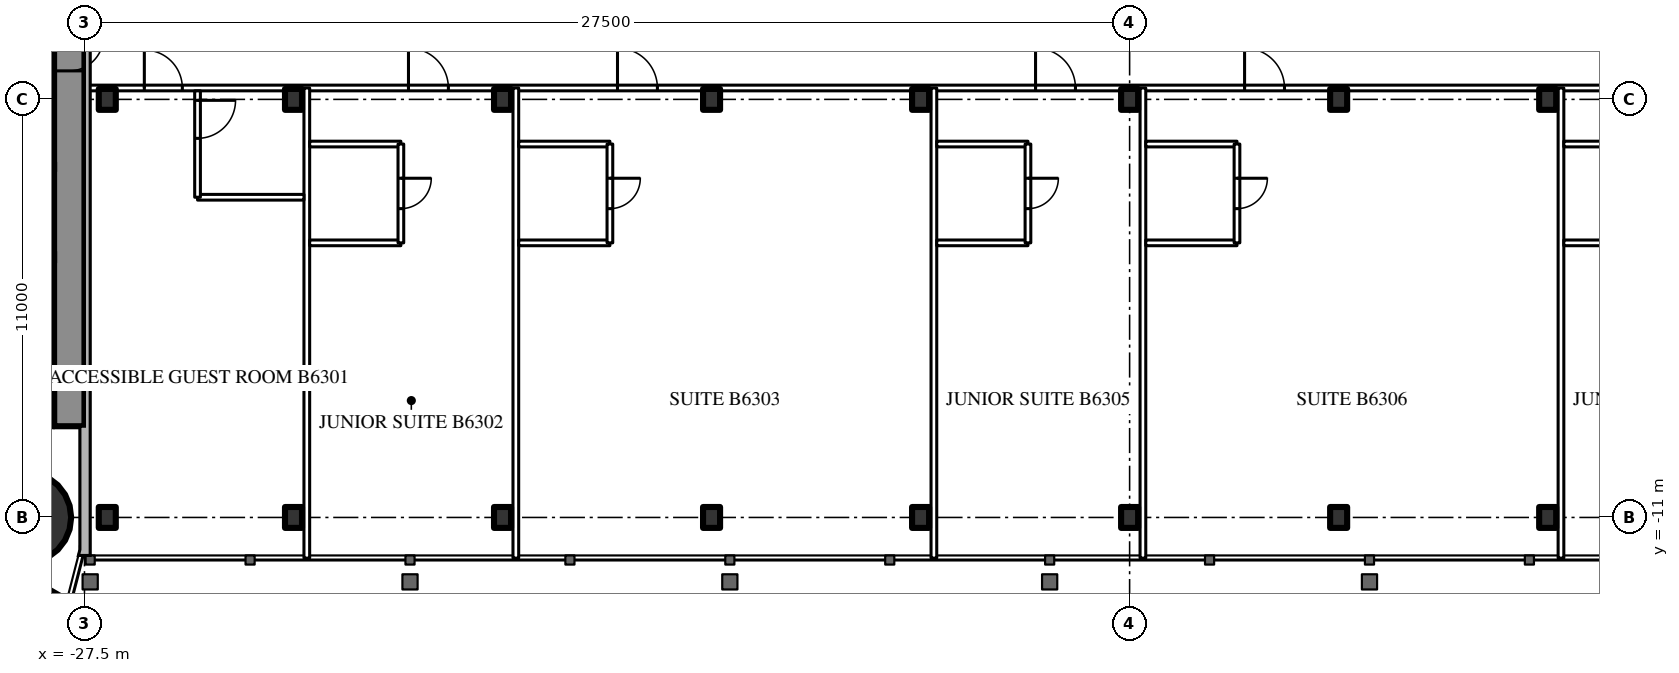
"""IFC4 building model, lengths in metres.
Left out: names, types, materials, properties, quantities, classifications, styles, units other than length and angle.
Written with IfcOpenShell. Run it as: python <this file> out.ifc"""

import sys

from ifc_helpers import new_model, si_unit, direction, frame, frame_2d, origin, origin_2d, place, context, subcontext, project, spatial, rectangle, circle, i_section, extrude, element, fill, save


model = new_model("IFC4")
c1 = context("Model", 3, precision=1e-05, world=origin(), true_north=direction((0.0, 1.0)))
c2 = subcontext(c1, "Body", "Model", "MODEL_VIEW")
j1 = project(units=[si_unit("LENGTHUNIT", "METRE"), si_unit("PLANEANGLEUNIT", "RADIAN")], contexts=[c1])
p1 = place(None, origin())
s1 = spatial("IfcSite", under=j1, at=p1, CompositionType="ELEMENT")
p2 = place(p1, origin())
s2 = spatial("IfcBuilding", under=s1, at=p2, CompositionType="ELEMENT")
p3 = place(p2, frame((0.0, 0.0, 236.9)))
s3 = spatial("IfcBuildingStorey", under=s2, at=p3, CompositionType="ELEMENT", Elevation=236.9)
p4 = place(p3, frame((-29.05, -11.0, 0.0), z_axis=(0.0, 0.0, 1.0), x_axis=(1.0, 0.0, 0.0)))
e1 = element("IfcColumn", 1, at=p4, inside=s3, PredefinedType="COLUMN", context=c2, shape_type="SweptSolid", body=[
    extrude(circle(Radius=1.2, at=origin_2d()), origin(), (0.0, 0.0, 1.0), 3.6),
])
p5 = place(p3, frame((-27.9, 8.6, 0.0), z_axis=(0.0, 0.0, 1.0), x_axis=(0.0, -1.0, 0.0)))
e2 = element("IfcWall", 2, at=p5, inside=s3, PredefinedType="SHEAR", context=c2, shape_type="SweptSolid", body=[
    extrude(rectangle(XDim=17.2, YDim=0.8, at=frame_2d((8.6, 0.0))), origin(), (0.0, 0.0, 1.0), 3.6),
])
p6 = place(p5, frame((6.95, 0.0, 0.0)))
e3 = element("IfcOpeningElement", 3, at=p6, cuts=e2, PredefinedType="OPENING", context=c2, shape_type="SweptSolid", body=[
    extrude(rectangle(XDim=0.9, YDim=2.2, at=frame_2d((0.45, 1.1))), frame((0.0, 0.41, 0.0), z_axis=(0.0, -1.0, 0.0), x_axis=(1.0, 0.0, 0.0)), (0.0, 0.0, 1.0), 0.82),
])
p7 = place(p3, frame((-28.3, -8.0, 0.0), z_axis=(0.0, 0.0, 1.0), x_axis=(-1.0, 0.0, 0.0)))
e4 = element("IfcWall", 4, at=p7, inside=s3, PredefinedType="SHEAR", context=c2, shape_type="SweptSolid", body=[
    extrude(rectangle(XDim=8.4, YDim=1.2, at=frame_2d((4.2, 0.0))), origin(), (0.0, 0.0, 1.0), 3.6),
])
p8 = place(p7, frame((0.25, 0.0, 0.0)))
e5 = element("IfcOpeningElement", 5, at=p8, cuts=e4, PredefinedType="OPENING", context=c2, shape_type="SweptSolid", body=[
    extrude(rectangle(XDim=1.0, YDim=2.2, at=frame_2d((0.5, 1.1))), frame((0.0, 0.61, 0.0), z_axis=(0.0, -1.0, 0.0), x_axis=(1.0, 0.0, 0.0)), (0.0, 0.0, 1.0), 1.22),
])
p9 = place(p3, frame((-28.3, -4.15, 0.0), z_axis=(0.0, 0.0, 1.0), x_axis=(-1.0, 0.0, 0.0)))
e6 = element("IfcWall", 6, at=p9, inside=s3, PredefinedType="SHEAR", context=c2, shape_type="SweptSolid", body=[
    extrude(rectangle(XDim=8.4, YDim=0.3, at=frame_2d((4.2, 0.0))), origin(), (0.0, 0.0, 1.0), 3.6),
])
p10 = place(p3, frame((-28.3, -1.775, 0.0), z_axis=(0.0, 0.0, 1.0), x_axis=(-1.0, 0.0, 0.0)))
e7 = element("IfcWall", 7, at=p10, inside=s3, PredefinedType="SHEAR", context=c2, shape_type="SweptSolid", body=[
    extrude(rectangle(XDim=2.9, YDim=0.25, at=frame_2d((1.45, 0.0))), origin(), (0.0, 0.0, 1.0), 3.6),
])
p11 = place(p3, frame((-27.2, 14.3, 0.0), z_axis=(0.0, 0.0, 1.0), x_axis=(-0.866026593062, -0.499997940104, 0.0)))
e8 = element("IfcWall", 8, at=p11, inside=s3, PredefinedType="SHEAR", context=c2, shape_type="SweptSolid", body=[
    extrude(rectangle(XDim=28.946, YDim=1.2, at=frame_2d((14.473, 0.0))), origin(), (0.0, 0.0, 1.0), 3.6),
])
p12 = place(p11, frame((4.6, 0.0, 0.0)))
e9 = element("IfcOpeningElement", 9, at=p12, cuts=e8, PredefinedType="OPENING", context=c2, shape_type="SweptSolid", body=[
    extrude(rectangle(XDim=1.0, YDim=2.2, at=frame_2d((0.5, 1.1))), frame((0.0, 0.61, 0.0), z_axis=(0.0, -1.0, 0.0), x_axis=(1.0, 0.0, 0.0)), (0.0, 0.0, 1.0), 1.22),
])
p13 = place(p11, frame((13.395, 0.0, 0.0)))
e10 = element("IfcOpeningElement", 10, at=p13, cuts=e8, PredefinedType="OPENING", context=c2, shape_type="SweptSolid", body=[
    extrude(rectangle(XDim=1.8, YDim=2.2, at=frame_2d((0.9, 1.1))), frame((0.0, 0.61, 0.0), z_axis=(0.0, -1.0, 0.0), x_axis=(1.0, 0.0, 0.0)), (0.0, 0.0, 1.0), 1.22),
])
p14 = place(p3, frame((-27.2, -14.3, 0.0), z_axis=(0.0, 0.0, 1.0), x_axis=(-0.866024021859, 0.500002393557, 0.0)))
e11 = element("IfcWall", 11, at=p14, inside=s3, PredefinedType="SHEAR", context=c2, shape_type="SweptSolid", body=[
    extrude(rectangle(XDim=27.907, YDim=1.2, at=frame_2d((13.954, 0.0))), origin(), (0.0, 0.0, 1.0), 3.6),
])
p15 = place(p14, frame((4.6, 0.0, 0.0)))
e12 = element("IfcOpeningElement", 12, at=p15, cuts=e11, PredefinedType="OPENING", context=c2, shape_type="SweptSolid", body=[
    extrude(rectangle(XDim=1.0, YDim=2.2, at=frame_2d((0.5, 1.1))), frame((0.0, 0.61, 0.0), z_axis=(0.0, -1.0, 0.0), x_axis=(1.0, 0.0, 0.0)), (0.0, 0.0, 1.0), 1.22),
])
p16 = place(p14, frame((13.395, 0.0, 0.0)))
e13 = element("IfcOpeningElement", 13, at=p16, cuts=e11, PredefinedType="OPENING", context=c2, shape_type="SweptSolid", body=[
    extrude(rectangle(XDim=1.8, YDim=2.2, at=frame_2d((0.9, 1.1))), frame((0.0, 0.61, 0.0), z_axis=(0.0, -1.0, 0.0), x_axis=(1.0, 0.0, 0.0)), (0.0, 0.0, 1.0), 1.22),
])
for number, where, z_axis, x_axis in (
    (14, (-26.9, -11.0, 0.0), (0.0, 0.0, 1.0), (1.0, 0.0, 0.0)),
    (15, (-22.0, -11.0, 0.0), (0.0, 0.0, 1.0), (1.0, 0.0, 0.0)),
    (16, (-16.5, -11.0, 0.0), (0.0, 0.0, 1.0), (1.0, 0.0, 0.0)),
    (17, (-11.0, -11.0, 0.0), (0.0, 0.0, 1.0), (1.0, 0.0, 0.0)),
    (18, (-5.5, -11.0, 0.0), (0.0, 0.0, 1.0), (1.0, 0.0, 0.0)),
    (19, (0.0, -11.0, 0.0), (0.0, 0.0, 1.0), (1.0, 0.0, 0.0)),
    (20, (5.5, -11.0, 0.0), (0.0, 0.0, 1.0), (1.0, 0.0, 0.0)),
    (21, (11.0, -11.0, 0.0), (0.0, 0.0, 1.0), (1.0, 0.0, 0.0)),
    (22, (-26.9, 0.0, 0.0), (0.0, 0.0, 1.0), (1.0, 0.0, 0.0)),
    (23, (-22.0, 0.0, 0.0), (0.0, 0.0, 1.0), (1.0, 0.0, 0.0)),
    (24, (-16.5, 0.0, 0.0), (0.0, 0.0, 1.0), (1.0, 0.0, 0.0)),
    (25, (-11.0, 0.0, 0.0), (0.0, 0.0, 1.0), (1.0, 0.0, 0.0)),
    (26, (-5.5, 0.0, 0.0), (0.0, 0.0, 1.0), (1.0, 0.0, 0.0)),
    (27, (0.0, 0.0, 0.0), (0.0, 0.0, 1.0), (1.0, 0.0, 0.0)),
    (28, (5.5, 0.0, 0.0), (0.0, 0.0, 1.0), (1.0, 0.0, 0.0)),
    (29, (11.0, 0.0, 0.0), (0.0, 0.0, 1.0), (1.0, 0.0, 0.0)),
):
    element("IfcColumn", number, at=place(p3, frame(where, z_axis=z_axis, x_axis=x_axis)), inside=s3, PredefinedType="COLUMN", context=c2, shape_type="SweptSolid", body=[
        extrude(i_section(OverallWidth=0.448, OverallDepth=0.55, WebThickness=0.072, FlangeThickness=0.115, FilletRadius=0.02, at=origin_2d()), origin(), (0.0, 0.0, 1.0), 3.6),
    ])
p17 = place(p3, frame((-27.5, 0.3, 0.0), z_axis=(0.0, 0.0, 1.0), x_axis=(1.0, 0.0, 0.0)))
e30 = element("IfcWall", 30, at=p17, inside=s3, PredefinedType="PARTITIONING", context=c2, shape_type="SweptSolid", body=[
    extrude(rectangle(XDim=55.0, YDim=0.15, at=frame_2d((27.5, 0.0))), origin(), (0.0, 0.0, 1.0), 2.4),
])
p18 = place(p17, frame((1.575, 0.0, 0.0)))
e31 = element("IfcOpeningElement", 31, at=p18, cuts=e30, PredefinedType="OPENING", context=c2, shape_type="SweptSolid", body=[
    extrude(rectangle(XDim=1.0, YDim=2.2, at=frame_2d((0.5, 1.1))), frame((0.0, 0.085, 0.0), z_axis=(0.0, -1.0, 0.0), x_axis=(1.0, 0.0, 0.0)), (0.0, 0.0, 1.0), 0.17),
])
p19 = place(p17, frame((8.525, 0.0, 0.0)))
e32 = element("IfcOpeningElement", 32, at=p19, cuts=e30, PredefinedType="OPENING", context=c2, shape_type="SweptSolid", body=[
    extrude(rectangle(XDim=1.05, YDim=2.4, at=frame_2d((0.525, 1.2))), frame((0.0, 0.085, 0.0), z_axis=(0.0, -1.0, 0.0), x_axis=(1.0, 0.0, 0.0)), (0.0, 0.0, 1.0), 0.17),
])
p20 = place(p17, frame((14.025, 0.0, 0.0)))
e33 = element("IfcOpeningElement", 33, at=p20, cuts=e30, PredefinedType="OPENING", context=c2, shape_type="SweptSolid", body=[
    extrude(rectangle(XDim=1.05, YDim=2.4, at=frame_2d((0.525, 1.2))), frame((0.0, 0.085, 0.0), z_axis=(0.0, -1.0, 0.0), x_axis=(1.0, 0.0, 0.0)), (0.0, 0.0, 1.0), 0.17),
])
p21 = place(p17, frame((25.025, 0.0, 0.0)))
e34 = element("IfcOpeningElement", 34, at=p21, cuts=e30, PredefinedType="OPENING", context=c2, shape_type="SweptSolid", body=[
    extrude(rectangle(XDim=1.05, YDim=2.4, at=frame_2d((0.525, 1.2))), frame((0.0, 0.085, 0.0), z_axis=(0.0, -1.0, 0.0), x_axis=(1.0, 0.0, 0.0)), (0.0, 0.0, 1.0), 0.17),
])
p22 = place(p17, frame((30.525, 0.0, 0.0)))
e35 = element("IfcOpeningElement", 35, at=p22, cuts=e30, PredefinedType="OPENING", context=c2, shape_type="SweptSolid", body=[
    extrude(rectangle(XDim=1.05, YDim=2.4, at=frame_2d((0.525, 1.2))), frame((0.0, 0.085, 0.0), z_axis=(0.0, -1.0, 0.0), x_axis=(1.0, 0.0, 0.0)), (0.0, 0.0, 1.0), 0.17),
])
p23 = place(p17, frame((41.525, 0.0, 0.0)))
e36 = element("IfcOpeningElement", 36, at=p23, cuts=e30, PredefinedType="OPENING", context=c2, shape_type="SweptSolid", body=[
    extrude(rectangle(XDim=1.05, YDim=2.4, at=frame_2d((0.525, 1.2))), frame((0.0, 0.085, 0.0), z_axis=(0.0, -1.0, 0.0), x_axis=(1.0, 0.0, 0.0)), (0.0, 0.0, 1.0), 0.17),
])
p24 = place(p17, frame((47.025, 0.0, 0.0)))
e37 = element("IfcOpeningElement", 37, at=p24, cuts=e30, PredefinedType="OPENING", context=c2, shape_type="SweptSolid", body=[
    extrude(rectangle(XDim=1.05, YDim=2.4, at=frame_2d((0.525, 1.2))), frame((0.0, 0.085, 0.0), z_axis=(0.0, -1.0, 0.0), x_axis=(1.0, 0.0, 0.0)), (0.0, 0.0, 1.0), 0.17),
])
p25 = place(p17, frame((52.525, 0.0, 0.0)))
e38 = element("IfcOpeningElement", 38, at=p25, cuts=e30, PredefinedType="OPENING", context=c2, shape_type="SweptSolid", body=[
    extrude(rectangle(XDim=1.05, YDim=2.4, at=frame_2d((0.525, 1.2))), frame((0.0, 0.085, 0.0), z_axis=(0.0, -1.0, 0.0), x_axis=(1.0, 0.0, 0.0)), (0.0, 0.0, 1.0), 0.17),
])
for number, where, z_axis, x_axis in (
    (39, (-21.65, -12.07, 0.0), (0.0, 0.0, 1.0), (0.0, 1.0, 0.0)),
    (40, (-16.15, -12.07, 0.0), (0.0, 0.0, 1.0), (0.0, 1.0, 0.0)),
    (41, (-5.15, -12.07, 0.0), (0.0, 0.0, 1.0), (0.0, 1.0, 0.0)),
    (42, (0.35, -12.07, 0.0), (0.0, 0.0, 1.0), (0.0, 1.0, 0.0)),
    (43, (11.35, -12.07, 0.0), (0.0, 0.0, 1.0), (0.0, 1.0, 0.0)),
):
    element("IfcWall", number, at=place(p3, frame(where, z_axis=z_axis, x_axis=x_axis)), inside=s3, PredefinedType="PARTITIONING", context=c2, shape_type="SweptSolid", body=[
        extrude(rectangle(XDim=12.37, YDim=0.15, at=frame_2d((6.185, 0.0))), origin(), (0.0, 0.0, 1.0), 3.4),
    ])
p26 = place(p3, frame((-24.525, -2.575, 0.0), z_axis=(0.0, 0.0, 1.0), x_axis=(1.0, 0.0, 0.0)))
e44 = element("IfcWall", 44, at=p26, inside=s3, PredefinedType="PARTITIONING", context=c2, shape_type="SweptSolid", body=[
    extrude(rectangle(XDim=2.8, YDim=0.15, at=frame_2d((1.4, 0.0))), origin(), (0.0, 0.0, 1.0), 3.4),
])
p27 = place(p3, frame((-24.525, -2.575, 0.0), z_axis=(0.0, 0.0, 1.0), x_axis=(0.0, 1.0, 0.0)))
e45 = element("IfcWall", 45, at=p27, inside=s3, PredefinedType="PARTITIONING", context=c2, shape_type="SweptSolid", body=[
    extrude(rectangle(XDim=2.8, YDim=0.15, at=frame_2d((1.4, 0.0))), origin(), (0.0, 0.0, 1.0), 3.4),
])
p28 = place(p27, frame((1.55, 0.0, 0.0)))
e46 = element("IfcOpeningElement", 46, at=p28, cuts=e45, PredefinedType="OPENING", context=c2, shape_type="SweptSolid", body=[
    extrude(rectangle(XDim=1.0, YDim=2.2, at=frame_2d((0.5, 1.1))), frame((0.0, 0.085, 0.0), z_axis=(0.0, -1.0, 0.0), x_axis=(1.0, 0.0, 0.0)), (0.0, 0.0, 1.0), 0.17),
])
for number, where, z_axis, x_axis in (
    (47, (-21.575, -3.775, 0.0), (0.0, 0.0, 1.0), (1.0, 0.0, 0.0)),
    (48, (-21.575, -1.175, 0.0), (0.0, 0.0, 1.0), (1.0, 0.0, 0.0)),
):
    element("IfcWall", number, at=place(p3, frame(where, z_axis=z_axis, x_axis=x_axis)), inside=s3, PredefinedType="PARTITIONING", context=c2, shape_type="SweptSolid", body=[
        extrude(rectangle(XDim=2.4, YDim=0.15, at=frame_2d((1.2, 0.0))), origin(), (0.0, 0.0, 1.0), 3.4),
    ])
p29 = place(p3, frame((-19.175, -3.775, 0.0), z_axis=(0.0, 0.0, 1.0), x_axis=(0.0, 1.0, 0.0)))
e49 = element("IfcWall", 49, at=p29, inside=s3, PredefinedType="PARTITIONING", context=c2, shape_type="SweptSolid", body=[
    extrude(rectangle(XDim=2.6, YDim=0.15, at=frame_2d((1.3, 0.0))), origin(), (0.0, 0.0, 1.0), 3.4),
])
p30 = place(p29, frame((0.9, 0.0, 0.0)))
e50 = element("IfcOpeningElement", 50, at=p30, cuts=e49, PredefinedType="OPENING", context=c2, shape_type="SweptSolid", body=[
    extrude(rectangle(XDim=0.8, YDim=2.2, at=frame_2d((0.4, 1.1))), frame((0.0, 0.085, 0.0), z_axis=(0.0, -1.0, 0.0), x_axis=(1.0, 0.0, 0.0)), (0.0, 0.0, 1.0), 0.17),
])
for number, where, z_axis, x_axis in (
    (51, (-16.075, -3.775, 0.0), (0.0, 0.0, 1.0), (1.0, 0.0, 0.0)),
    (52, (-16.075, -1.175, 0.0), (0.0, 0.0, 1.0), (1.0, 0.0, 0.0)),
):
    element("IfcWall", number, at=place(p3, frame(where, z_axis=z_axis, x_axis=x_axis)), inside=s3, PredefinedType="PARTITIONING", context=c2, shape_type="SweptSolid", body=[
        extrude(rectangle(XDim=2.4, YDim=0.15, at=frame_2d((1.2, 0.0))), origin(), (0.0, 0.0, 1.0), 3.4),
    ])
p31 = place(p3, frame((-13.675, -3.775, 0.0), z_axis=(0.0, 0.0, 1.0), x_axis=(0.0, 1.0, 0.0)))
e53 = element("IfcWall", 53, at=p31, inside=s3, PredefinedType="PARTITIONING", context=c2, shape_type="SweptSolid", body=[
    extrude(rectangle(XDim=2.6, YDim=0.15, at=frame_2d((1.3, 0.0))), origin(), (0.0, 0.0, 1.0), 3.4),
])
p32 = place(p31, frame((0.9, 0.0, 0.0)))
e54 = element("IfcOpeningElement", 54, at=p32, cuts=e53, PredefinedType="OPENING", context=c2, shape_type="SweptSolid", body=[
    extrude(rectangle(XDim=0.8, YDim=2.2, at=frame_2d((0.4, 1.1))), frame((0.0, 0.085, 0.0), z_axis=(0.0, -1.0, 0.0), x_axis=(1.0, 0.0, 0.0)), (0.0, 0.0, 1.0), 0.17),
])
for number, where, z_axis, x_axis in (
    (55, (-5.075, -3.775, 0.0), (0.0, 0.0, 1.0), (1.0, 0.0, 0.0)),
    (56, (-5.075, -1.175, 0.0), (0.0, 0.0, 1.0), (1.0, 0.0, 0.0)),
):
    element("IfcWall", number, at=place(p3, frame(where, z_axis=z_axis, x_axis=x_axis)), inside=s3, PredefinedType="PARTITIONING", context=c2, shape_type="SweptSolid", body=[
        extrude(rectangle(XDim=2.4, YDim=0.15, at=frame_2d((1.2, 0.0))), origin(), (0.0, 0.0, 1.0), 3.4),
    ])
p33 = place(p3, frame((-2.675, -3.775, 0.0), z_axis=(0.0, 0.0, 1.0), x_axis=(0.0, 1.0, 0.0)))
e57 = element("IfcWall", 57, at=p33, inside=s3, PredefinedType="PARTITIONING", context=c2, shape_type="SweptSolid", body=[
    extrude(rectangle(XDim=2.6, YDim=0.15, at=frame_2d((1.3, 0.0))), origin(), (0.0, 0.0, 1.0), 3.4),
])
p34 = place(p33, frame((0.9, 0.0, 0.0)))
e58 = element("IfcOpeningElement", 58, at=p34, cuts=e57, PredefinedType="OPENING", context=c2, shape_type="SweptSolid", body=[
    extrude(rectangle(XDim=0.8, YDim=2.2, at=frame_2d((0.4, 1.1))), frame((0.0, 0.085, 0.0), z_axis=(0.0, -1.0, 0.0), x_axis=(1.0, 0.0, 0.0)), (0.0, 0.0, 1.0), 0.17),
])
for number, where, z_axis, x_axis in (
    (59, (0.425, -3.775, 0.0), (0.0, 0.0, 1.0), (1.0, 0.0, 0.0)),
    (60, (0.425, -1.175, 0.0), (0.0, 0.0, 1.0), (1.0, 0.0, 0.0)),
):
    element("IfcWall", number, at=place(p3, frame(where, z_axis=z_axis, x_axis=x_axis)), inside=s3, PredefinedType="PARTITIONING", context=c2, shape_type="SweptSolid", body=[
        extrude(rectangle(XDim=2.4, YDim=0.15, at=frame_2d((1.2, 0.0))), origin(), (0.0, 0.0, 1.0), 3.4),
    ])
p35 = place(p3, frame((2.825, -3.775, 0.0), z_axis=(0.0, 0.0, 1.0), x_axis=(0.0, 1.0, 0.0)))
e61 = element("IfcWall", 61, at=p35, inside=s3, PredefinedType="PARTITIONING", context=c2, shape_type="SweptSolid", body=[
    extrude(rectangle(XDim=2.6, YDim=0.15, at=frame_2d((1.3, 0.0))), origin(), (0.0, 0.0, 1.0), 3.4),
])
p36 = place(p35, frame((0.9, 0.0, 0.0)))
e62 = element("IfcOpeningElement", 62, at=p36, cuts=e61, PredefinedType="OPENING", context=c2, shape_type="SweptSolid", body=[
    extrude(rectangle(XDim=0.8, YDim=2.2, at=frame_2d((0.4, 1.1))), frame((0.0, 0.085, 0.0), z_axis=(0.0, -1.0, 0.0), x_axis=(1.0, 0.0, 0.0)), (0.0, 0.0, 1.0), 0.17),
])
for number, where, z_axis, x_axis in (
    (63, (11.425, -3.775, 0.0), (0.0, 0.0, 1.0), (1.0, 0.0, 0.0)),
    (64, (11.425, -1.175, 0.0), (0.0, 0.0, 1.0), (1.0, 0.0, 0.0)),
):
    element("IfcWall", number, at=place(p3, frame(where, z_axis=z_axis, x_axis=x_axis)), inside=s3, PredefinedType="PARTITIONING", context=c2, shape_type="SweptSolid", body=[
        extrude(rectangle(XDim=2.4, YDim=0.15, at=frame_2d((1.2, 0.0))), origin(), (0.0, 0.0, 1.0), 3.4),
    ])
p37 = place(p6, origin())
e65 = element("IfcDoor", 65, at=p37, inside=s3, OperationType="SINGLE_SWING_LEFT", PredefinedType="DOOR", context=c2, shape_type="SweptSolid", body=[
    extrude(rectangle(XDim=0.9, YDim=2.2, at=frame_2d((0.45, 1.1))), frame((0.0, 0.025, 0.0), z_axis=(0.0, -1.0, 0.0), x_axis=(1.0, 0.0, 0.0)), (0.0, 0.0, 1.0), 0.05),
])
fill(e3, e65)
p38 = place(p28, origin())
e66 = element("IfcDoor", 66, at=p38, inside=s3, OperationType="SINGLE_SWING_RIGHT", PredefinedType="DOOR", context=c2, shape_type="SweptSolid", body=[
    extrude(rectangle(XDim=1.0, YDim=2.2, at=frame_2d((0.5, 1.1))), frame((0.0, 0.025, 0.0), z_axis=(0.0, -1.0, 0.0), x_axis=(1.0, 0.0, 0.0)), (0.0, 0.0, 1.0), 0.05),
])
fill(e46, e66)
p39 = place(p18, origin())
e67 = element("IfcDoor", 67, at=p39, inside=s3, OperationType="SINGLE_SWING_LEFT", PredefinedType="DOOR", context=c2, shape_type="SweptSolid", body=[
    extrude(rectangle(XDim=1.0, YDim=2.2, at=frame_2d((0.5, 1.1))), frame((0.0, 0.025, 0.0), z_axis=(0.0, -1.0, 0.0), x_axis=(1.0, 0.0, 0.0)), (0.0, 0.0, 1.0), 0.05),
])
fill(e31, e67)
p40 = place(p30, origin())
e68 = element("IfcDoor", 68, at=p40, inside=s3, OperationType="SINGLE_SWING_RIGHT", PredefinedType="DOOR", context=c2, shape_type="SweptSolid", body=[
    extrude(rectangle(XDim=0.8, YDim=2.2, at=frame_2d((0.4, 1.1))), frame((0.0, 0.025, 0.0), z_axis=(0.0, -1.0, 0.0), x_axis=(1.0, 0.0, 0.0)), (0.0, 0.0, 1.0), 0.05),
])
fill(e50, e68)
p41 = place(p19, origin())
e69 = element("IfcDoor", 69, at=p41, inside=s3, OperationType="SINGLE_SWING_LEFT", PredefinedType="DOOR", context=c2, shape_type="SweptSolid", body=[
    extrude(rectangle(XDim=1.05, YDim=2.4, at=frame_2d((0.525, 1.2))), frame((0.0, 0.025, 0.0), z_axis=(0.0, -1.0, 0.0), x_axis=(1.0, 0.0, 0.0)), (0.0, 0.0, 1.0), 0.05),
])
fill(e32, e69)
p42 = place(p32, origin())
e70 = element("IfcDoor", 70, at=p42, inside=s3, OperationType="SINGLE_SWING_RIGHT", PredefinedType="DOOR", context=c2, shape_type="SweptSolid", body=[
    extrude(rectangle(XDim=0.8, YDim=2.2, at=frame_2d((0.4, 1.1))), frame((0.0, 0.025, 0.0), z_axis=(0.0, -1.0, 0.0), x_axis=(1.0, 0.0, 0.0)), (0.0, 0.0, 1.0), 0.05),
])
fill(e54, e70)
p43 = place(p20, origin())
e71 = element("IfcDoor", 71, at=p43, inside=s3, OperationType="SINGLE_SWING_LEFT", PredefinedType="DOOR", context=c2, shape_type="SweptSolid", body=[
    extrude(rectangle(XDim=1.05, YDim=2.4, at=frame_2d((0.525, 1.2))), frame((0.0, 0.025, 0.0), z_axis=(0.0, -1.0, 0.0), x_axis=(1.0, 0.0, 0.0)), (0.0, 0.0, 1.0), 0.05),
])
fill(e33, e71)
p44 = place(p34, origin())
e72 = element("IfcDoor", 72, at=p44, inside=s3, OperationType="SINGLE_SWING_RIGHT", PredefinedType="DOOR", context=c2, shape_type="SweptSolid", body=[
    extrude(rectangle(XDim=0.8, YDim=2.2, at=frame_2d((0.4, 1.1))), frame((0.0, 0.025, 0.0), z_axis=(0.0, -1.0, 0.0), x_axis=(1.0, 0.0, 0.0)), (0.0, 0.0, 1.0), 0.05),
])
fill(e58, e72)
p45 = place(p21, origin())
e73 = element("IfcDoor", 73, at=p45, inside=s3, OperationType="SINGLE_SWING_LEFT", PredefinedType="DOOR", context=c2, shape_type="SweptSolid", body=[
    extrude(rectangle(XDim=1.05, YDim=2.4, at=frame_2d((0.525, 1.2))), frame((0.0, 0.025, 0.0), z_axis=(0.0, -1.0, 0.0), x_axis=(1.0, 0.0, 0.0)), (0.0, 0.0, 1.0), 0.05),
])
fill(e34, e73)
p46 = place(p36, origin())
e74 = element("IfcDoor", 74, at=p46, inside=s3, OperationType="SINGLE_SWING_RIGHT", PredefinedType="DOOR", context=c2, shape_type="SweptSolid", body=[
    extrude(rectangle(XDim=0.8, YDim=2.2, at=frame_2d((0.4, 1.1))), frame((0.0, 0.025, 0.0), z_axis=(0.0, -1.0, 0.0), x_axis=(1.0, 0.0, 0.0)), (0.0, 0.0, 1.0), 0.05),
])
fill(e62, e74)
p47 = place(p22, origin())
e75 = element("IfcDoor", 75, at=p47, inside=s3, OperationType="SINGLE_SWING_LEFT", PredefinedType="DOOR", context=c2, shape_type="SweptSolid", body=[
    extrude(rectangle(XDim=1.05, YDim=2.4, at=frame_2d((0.525, 1.2))), frame((0.0, 0.025, 0.0), z_axis=(0.0, -1.0, 0.0), x_axis=(1.0, 0.0, 0.0)), (0.0, 0.0, 1.0), 0.05),
])
fill(e35, e75)
save(model, sys.argv[1])
